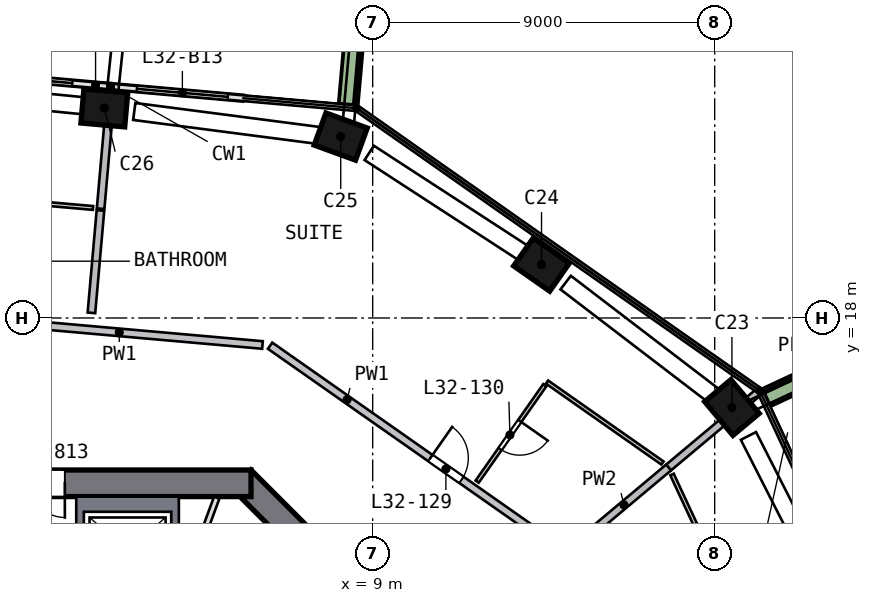
"""IFC4 building model, lengths in metres.
Left out: names, types, materials, properties, quantities, classifications, styles, units other than length and angle.
Written with IfcOpenShell. Run it as: python <this file> out.ifc"""

import sys

from ifc_helpers import new_model, si_unit, direction, frame, frame_2d, origin, origin_2d, place, context, subcontext, project, spatial, polyline, rectangle, outline, extrude, element, fill, save


model = new_model("IFC4")
c1 = context("Model", 3, precision=1e-05, world=origin(), true_north=direction((0.0, 1.0)))
c2 = subcontext(c1, "Body", "Model", "MODEL_VIEW")
j1 = project(units=[si_unit("LENGTHUNIT", "METRE"), si_unit("PLANEANGLEUNIT", "RADIAN")], contexts=[c1])
p1 = place(None, origin())
s1 = spatial("IfcSite", under=j1, at=p1, CompositionType="ELEMENT")
p2 = place(p1, origin())
s2 = spatial("IfcBuilding", under=s1, at=p2, CompositionType="ELEMENT")
p3 = place(p2, frame((0.0, 0.0, 136.5)))
s3 = spatial("IfcBuildingStorey", under=s2, at=p3, CompositionType="ELEMENT", Elevation=136.5)
p4 = place(p3, frame((18.543, 15.538, 0.0), z_axis=(-0.074581932, 0.087582452, 0.993361389), x_axis=(0.637591081, -0.761738409, 0.115031341)))
e1 = element("IfcColumn", 1, at=p4, inside=s3, PredefinedType="COLUMN", context=c2, shape_type="SweptSolid", body=[
    extrude(rectangle(XDim=1.15, YDim=0.9, at=origin_2d()), origin(), (0.0, 0.0, 1.0), 3.211),
])
p5 = place(p3, frame((13.555, 19.329, 0.0), z_axis=(-0.092477164, 0.063730151, 0.993673207), x_axis=(-0.813386058, 0.57078057, -0.112306105)))
e2 = element("IfcColumn", 2, at=p5, inside=s3, PredefinedType="COLUMN", context=c2, shape_type="SweptSolid", body=[
    extrude(rectangle(XDim=1.15, YDim=0.9, at=origin_2d()), origin(), (0.0, 0.0, 1.0), 3.21),
])
p6 = place(p3, frame((8.29, 22.728, 0.0), z_axis=(-0.108413363, 0.038545284, 0.993358346), x_axis=(0.933103009, -0.340705914, 0.115057614)))
e3 = element("IfcColumn", 3, at=p6, inside=s3, PredefinedType="COLUMN", context=c2, shape_type="SweptSolid", body=[
    extrude(rectangle(XDim=1.15, YDim=0.9, at=origin_2d()), origin(), (0.0, 0.0, 1.0), 3.211),
])
p7 = place(p3, frame((2.074, 23.517, 0.0), z_axis=(-0.111946178, 0.008897896, 0.993674434), x_axis=(-0.989847104, 0.087134884, -0.112295249)))
e4 = element("IfcColumn", 4, at=p7, inside=s3, PredefinedType="COLUMN", context=c2, shape_type="SweptSolid", body=[
    extrude(rectangle(XDim=1.15, YDim=0.9, at=origin_2d()), origin(), (0.0, 0.0, 1.0), 3.21),
])
p8 = place(p3, frame((13.752, 5.552, 0.0), z_axis=(0.0, 0.0, 1.0), x_axis=(-0.707106781, 0.707106781, 0.0)))
e5 = element("IfcWall", 5, at=p8, inside=s3, PredefinedType="SHEAR", context=c2, shape_type="SweptSolid", body=[
    extrude(rectangle(XDim=11.598, YDim=0.7, at=frame_2d((5.799, 0.0))), origin(), (0.0, 0.0, 1.0), 3.5),
])
p9 = place(p8, frame((2.099, 0.0, 0.0)))
e6 = element("IfcOpeningElement", 6, at=p9, cuts=e5, PredefinedType="OPENING", context=c2, shape_type="SweptSolid", body=[
    extrude(rectangle(XDim=1.2, YDim=2.1, at=frame_2d((0.6, 1.05))), frame((0.0, 0.36, 0.0), z_axis=(0.0, -1.0, 0.0), x_axis=(1.0, 0.0, 0.0)), (0.0, 0.0, 1.0), 0.72),
])
p10 = place(p3, frame((5.799, 13.65, 0.0), z_axis=(0.0, 0.0, 1.0), x_axis=(-1.0, 0.0, 0.0)))
e7 = element("IfcWall", 7, at=p10, inside=s3, PredefinedType="SHEAR", context=c2, shape_type="SweptSolid", body=[
    extrude(rectangle(XDim=11.598, YDim=0.7, at=frame_2d((5.799, 0.0))), origin(), (0.0, 0.0, 1.0), 3.5),
])
p11 = place(p10, frame((4.899, 0.0, 0.0)))
e8 = element("IfcOpeningElement", 8, at=p11, cuts=e7, PredefinedType="OPENING", context=c2, shape_type="SweptSolid", body=[
    extrude(rectangle(XDim=1.8, YDim=2.1, at=frame_2d((0.9, 1.05))), frame((0.0, 0.36, 0.0), z_axis=(0.0, -1.0, 0.0), x_axis=(1.0, 0.0, 0.0)), (0.0, 0.0, 1.0), 0.72),
])
p12 = place(p3, frame((5.586, 23.784, 0.0), z_axis=(0.0, 0.0, 1.0), x_axis=(-0.996130393, 0.087887659, 0.0)))
e9 = element("IfcWall", 9, at=p12, inside=s3, PredefinedType="SOLIDWALL", context=c2, shape_type="SweptSolid", body=[
    extrude(rectangle(XDim=3.475, YDim=0.15, at=frame_2d((1.738, 0.0))), origin(), (0.0, 0.0, 1.0), 2.475),
])
p13 = place(p12, frame((0.4, 0.0, 0.0)))
e10 = element("IfcOpeningElement", 10, at=p13, cuts=e9, PredefinedType="OPENING", context=c2, shape_type="SweptSolid", body=[
    extrude(rectangle(XDim=2.4, YDim=2.4, at=frame_2d((1.2, 1.2))), frame((0.0, 0.085, 0.0), z_axis=(0.0, -1.0, 0.0), x_axis=(1.0, 0.0, 0.0)), (0.0, 0.0, 1.0), 0.17),
])
p14 = place(p3, frame((2.125, 24.09, 0.0), z_axis=(0.0, 0.0, 1.0), x_axis=(-0.996134275, 0.087843651, 0.0)))
e11 = element("IfcWall", 11, at=p14, inside=s3, PredefinedType="SOLIDWALL", context=c2, shape_type="SweptSolid", body=[
    extrude(rectangle(XDim=3.835, YDim=0.15, at=frame_2d((1.918, 0.0))), origin(), (0.0, 0.0, 1.0), 2.475),
])
p15 = place(p14, frame((1.035, 0.0, 0.0)))
e12 = element("IfcOpeningElement", 12, at=p15, cuts=e11, PredefinedType="OPENING", context=c2, shape_type="SweptSolid", body=[
    extrude(rectangle(XDim=2.4, YDim=2.4, at=frame_2d((1.2, 1.2))), frame((0.0, 0.085, 0.0), z_axis=(0.0, -1.0, 0.0), x_axis=(1.0, 0.0, 0.0)), (0.0, 0.0, 1.0), 0.17),
])
p16 = place(p3, frame((21.803, 17.042, 0.0), z_axis=(0.0, 0.0, 1.0), x_axis=(-0.906596382, -0.421998815, 0.0)))
e13 = element("IfcWall", 13, at=p16, inside=s3, PredefinedType="SOLIDWALL", context=c2, shape_type="SweptSolid", body=[
    extrude(rectangle(XDim=2.699, YDim=0.5, at=frame_2d((1.35, 0.0))), origin(), (0.0, 0.0, 1.0), 0.7),
])
p17 = place(p3, frame((8.357, 23.616, 0.0), z_axis=(0.0, 0.0, 1.0), x_axis=(0.087920539, 0.996127491, 0.0)))
e14 = element("IfcWall", 14, at=p17, inside=s3, PredefinedType="SOLIDWALL", context=c2, shape_type="SweptSolid", body=[
    extrude(rectangle(XDim=3.199, YDim=0.5, at=frame_2d((1.6, 0.0))), origin(), (0.0, 0.0, 1.0), 0.7),
])
p18 = place(p3, origin())
e15 = element("IfcWall", 15, at=p18, inside=s3, PredefinedType="SOLIDWALL", context=c2, shape_type="SweptSolid", body=[
    extrude(outline(polyline([(3.9, 13.3), (3.9, 10.9), (3.7, 10.9), (3.7, 12.9), (1.4, 12.9), (1.4, 10.9), (1.2, 10.9), (1.2, 13.3), (3.9, 13.3)])), origin(), (0.0, 0.0, 1.0), 3.19),
])
p19 = place(p3, frame((1.776, 4.813, 0.0), z_axis=(0.0, 0.0, 1.0), x_axis=(0.346109381, 0.938194168, 0.0)))
e16 = element("IfcWall", 16, at=p19, inside=s3, PredefinedType="PARTITIONING", context=c2, shape_type="SweptSolid", body=[
    extrude(rectangle(XDim=9.016, YDim=0.15, at=frame_2d((4.508, 0.0))), origin(), (0.0, 0.0, 1.0), 3.19),
])
p20 = place(p19, frame((1.4, 0.0, 0.0)))
e17 = element("IfcOpeningElement", 17, at=p20, cuts=e16, PredefinedType="OPENING", context=c2, shape_type="SweptSolid", body=[
    extrude(rectangle(XDim=1.8, YDim=2.1, at=frame_2d((0.9, 1.05))), frame((0.0, 0.085, 0.0), z_axis=(0.0, -1.0, 0.0), x_axis=(1.0, 0.0, 0.0)), (0.0, 0.0, 1.0), 0.17),
])
p21 = place(p3, frame((-3.18, 18.108, 0.0), z_axis=(0.0, 0.0, 1.0), x_axis=(0.996134235, -0.087844097, 0.0)))
e18 = element("IfcWall", 18, at=p21, inside=s3, PredefinedType="SOLIDWALL", context=c2, shape_type="SweptSolid", body=[
    extrude(rectangle(XDim=9.316, YDim=0.2, at=frame_2d((4.658, 0.0))), origin(), (0.0, 0.0, 1.0), 3.19),
])
p22 = place(p21, frame((0.55, 0.0, 0.0)))
e19 = element("IfcOpeningElement", 19, at=p22, cuts=e18, PredefinedType="OPENING", context=c2, shape_type="SweptSolid", body=[
    extrude(rectangle(XDim=1.0, YDim=2.1, at=frame_2d((0.5, 1.05))), frame((0.0, 0.11, 0.0), z_axis=(0.0, -1.0, 0.0), x_axis=(1.0, 0.0, 0.0)), (0.0, 0.0, 1.0), 0.22),
])
p23 = place(p3, frame((6.301, 17.271, 0.0), z_axis=(0.0, 0.0, 1.0), x_axis=(0.818750717, -0.574149165, 0.0)))
e20 = element("IfcWall", 20, at=p23, inside=s3, PredefinedType="SOLIDWALL", context=c2, shape_type="SweptSolid", body=[
    extrude(rectangle(XDim=9.516, YDim=0.2, at=frame_2d((4.758, 0.0))), origin(), (0.0, 0.0, 1.0), 3.19),
])
p24 = place(p23, frame((5.15, 0.0, 0.0)))
e21 = element("IfcOpeningElement", 21, at=p24, cuts=e20, PredefinedType="OPENING", context=c2, shape_type="SweptSolid", body=[
    extrude(rectangle(XDim=1.0, YDim=2.1, at=frame_2d((0.5, 1.05))), frame((0.0, 0.11, 0.0), z_axis=(0.0, -1.0, 0.0), x_axis=(1.0, 0.0, 0.0)), (0.0, 0.0, 1.0), 0.22),
])
p25 = place(p3, frame((1.599, 18.135, 0.0), z_axis=(0.0, 0.0, 1.0), x_axis=(0.087825319, 0.996135891, 0.0)))
e22 = element("IfcWall", 22, at=p25, inside=s3, PredefinedType="SOLIDWALL", context=c2, shape_type="SweptSolid", body=[
    extrude(rectangle(XDim=2.705, YDim=0.2, at=frame_2d((1.353, 0.0))), origin(), (0.0, 0.0, 1.0), 3.19),
])
p26 = place(p3, frame((1.841, 20.875, 0.0), z_axis=(0.0, 0.0, 1.0), x_axis=(0.087832778, 0.996135233, 0.0)))
e23 = element("IfcWall", 23, at=p26, inside=s3, PredefinedType="SOLIDWALL", context=c2, shape_type="SweptSolid", body=[
    extrude(rectangle(XDim=3.152, YDim=0.2, at=frame_2d((1.576, 0.0))), origin(), (0.0, 0.0, 1.0), 3.19),
])
p27 = place(p3, frame((14.435, 12.095, 0.0), z_axis=(0.0, 0.0, 1.0), x_axis=(0.766505681, 0.642237527, 0.0)))
e24 = element("IfcWall", 24, at=p27, inside=s3, PredefinedType="SOLIDWALL", context=c2, shape_type="SweptSolid", body=[
    extrude(rectangle(XDim=3.073, YDim=0.2, at=frame_2d((1.536, 0.0))), origin(), (0.0, 0.0, 1.0), 3.19),
])
p28 = place(p3, frame((16.79, 14.068, 0.0), z_axis=(0.0, 0.0, 1.0), x_axis=(0.766498184, 0.642246474, 0.0)))
e25 = element("IfcWall", 25, at=p28, inside=s3, PredefinedType="SOLIDWALL", context=c2, shape_type="SweptSolid", body=[
    extrude(rectangle(XDim=3.059, YDim=0.2, at=frame_2d((1.53, 0.0))), origin(), (0.0, 0.0, 1.0), 3.19),
])
p29 = place(p3, frame((-0.749, 21.106, 0.0), z_axis=(0.0, 0.0, 1.0), x_axis=(0.996139536, -0.08778397, 0.0)))
e26 = element("IfcWall", 26, at=p29, inside=s3, PredefinedType="PARTITIONING", context=c2, shape_type="SweptSolid", body=[
    extrude(rectangle(XDim=2.4, YDim=0.1, at=frame_2d((1.2, 0.0))), origin(), (0.0, 0.0, 1.0), 3.19),
])
p30 = place(p3, frame((13.53, 16.232, 0.0), z_axis=(0.0, 0.0, 1.0), x_axis=(-0.574138719, -0.818758042, 0.0)))
e27 = element("IfcWall", 27, at=p30, inside=s3, PredefinedType="PARTITIONING", context=c2, shape_type="SweptSolid", body=[
    extrude(rectangle(XDim=3.1, YDim=0.1, at=frame_2d((1.55, 0.0))), origin(), (0.0, 0.0, 1.0), 3.19),
])
p31 = place(p30, frame((1.15, 0.0, 0.0)))
e28 = element("IfcOpeningElement", 28, at=p31, cuts=e27, PredefinedType="OPENING", context=c2, shape_type="SweptSolid", body=[
    extrude(rectangle(XDim=0.9, YDim=2.1, at=frame_2d((0.45, 1.05))), frame((0.0, 0.06, 0.0), z_axis=(0.0, -1.0, 0.0), x_axis=(1.0, 0.0, 0.0)), (0.0, 0.0, 1.0), 0.12),
])
p32 = place(p3, frame((13.588, 16.314, 0.0), z_axis=(0.0, 0.0, 1.0), x_axis=(0.818743323, -0.574159708, 0.0)))
e29 = element("IfcWall", 29, at=p32, inside=s3, PredefinedType="PARTITIONING", context=c2, shape_type="SweptSolid", body=[
    extrude(rectangle(XDim=3.711, YDim=0.1, at=frame_2d((1.855, 0.0))), origin(), (0.0, 0.0, 1.0), 3.19),
])
p33 = place(p3, frame((18.44, 10.523, 0.0), z_axis=(0.0, 0.0, 1.0), x_axis=(-0.421990349, 0.906600323, 0.0)))
e30 = element("IfcWall", 30, at=p33, inside=s3, PredefinedType="PARTITIONING", context=c2, shape_type="SweptSolid", body=[
    extrude(rectangle(XDim=3.704, YDim=0.1, at=frame_2d((1.852, 0.0))), origin(), (0.0, 0.0, 1.0), 3.19),
])
p34 = place(p13, origin())
e31 = element("IfcDoor", 31, at=p34, inside=s3, OperationType="SLIDING_TO_RIGHT", PredefinedType="DOOR", context=c2, shape_type="SweptSolid", body=[
    extrude(rectangle(XDim=2.4, YDim=2.4, at=frame_2d((1.2, 1.2))), frame((0.0, 0.025, 0.0), z_axis=(0.0, -1.0, 0.0), x_axis=(1.0, 0.0, 0.0)), (0.0, 0.0, 1.0), 0.05),
])
fill(e10, e31)
p35 = place(p15, origin())
e32 = element("IfcDoor", 32, at=p35, inside=s3, OperationType="SLIDING_TO_LEFT", PredefinedType="DOOR", context=c2, shape_type="SweptSolid", body=[
    extrude(rectangle(XDim=2.4, YDim=2.4, at=frame_2d((1.2, 1.2))), frame((0.0, 0.025, 0.0), z_axis=(0.0, -1.0, 0.0), x_axis=(1.0, 0.0, 0.0)), (0.0, 0.0, 1.0), 0.05),
])
fill(e12, e32)
p36 = place(p11, origin())
e33 = element("IfcDoor", 33, at=p36, inside=s3, OperationType="DOUBLE_DOOR_SINGLE_SWING", PredefinedType="DOOR", context=c2, shape_type="SweptSolid", body=[
    extrude(rectangle(XDim=1.8, YDim=2.1, at=frame_2d((0.9, 1.05))), frame((0.0, 0.025, 0.0), z_axis=(0.0, -1.0, 0.0), x_axis=(1.0, 0.0, 0.0)), (0.0, 0.0, 1.0), 0.05),
])
fill(e8, e33)
p37 = place(p24, origin())
e34 = element("IfcDoor", 34, at=p37, inside=s3, OperationType="SINGLE_SWING_LEFT", PredefinedType="DOOR", context=c2, shape_type="SweptSolid", body=[
    extrude(rectangle(XDim=1.0, YDim=2.1, at=frame_2d((0.5, 1.05))), frame((0.0, 0.025, 0.0), z_axis=(0.0, -1.0, 0.0), x_axis=(1.0, 0.0, 0.0)), (0.0, 0.0, 1.0), 0.05),
])
fill(e21, e34)
p38 = place(p31, origin())
e35 = element("IfcDoor", 35, at=p38, inside=s3, OperationType="SINGLE_SWING_LEFT", PredefinedType="DOOR", context=c2, shape_type="SweptSolid", body=[
    extrude(rectangle(XDim=0.9, YDim=2.1, at=frame_2d((0.45, 1.05))), frame((0.0, 0.025, 0.0), z_axis=(0.0, -1.0, 0.0), x_axis=(1.0, 0.0, 0.0)), (0.0, 0.0, 1.0), 0.05),
])
fill(e28, e35)
save(model, sys.argv[1])
